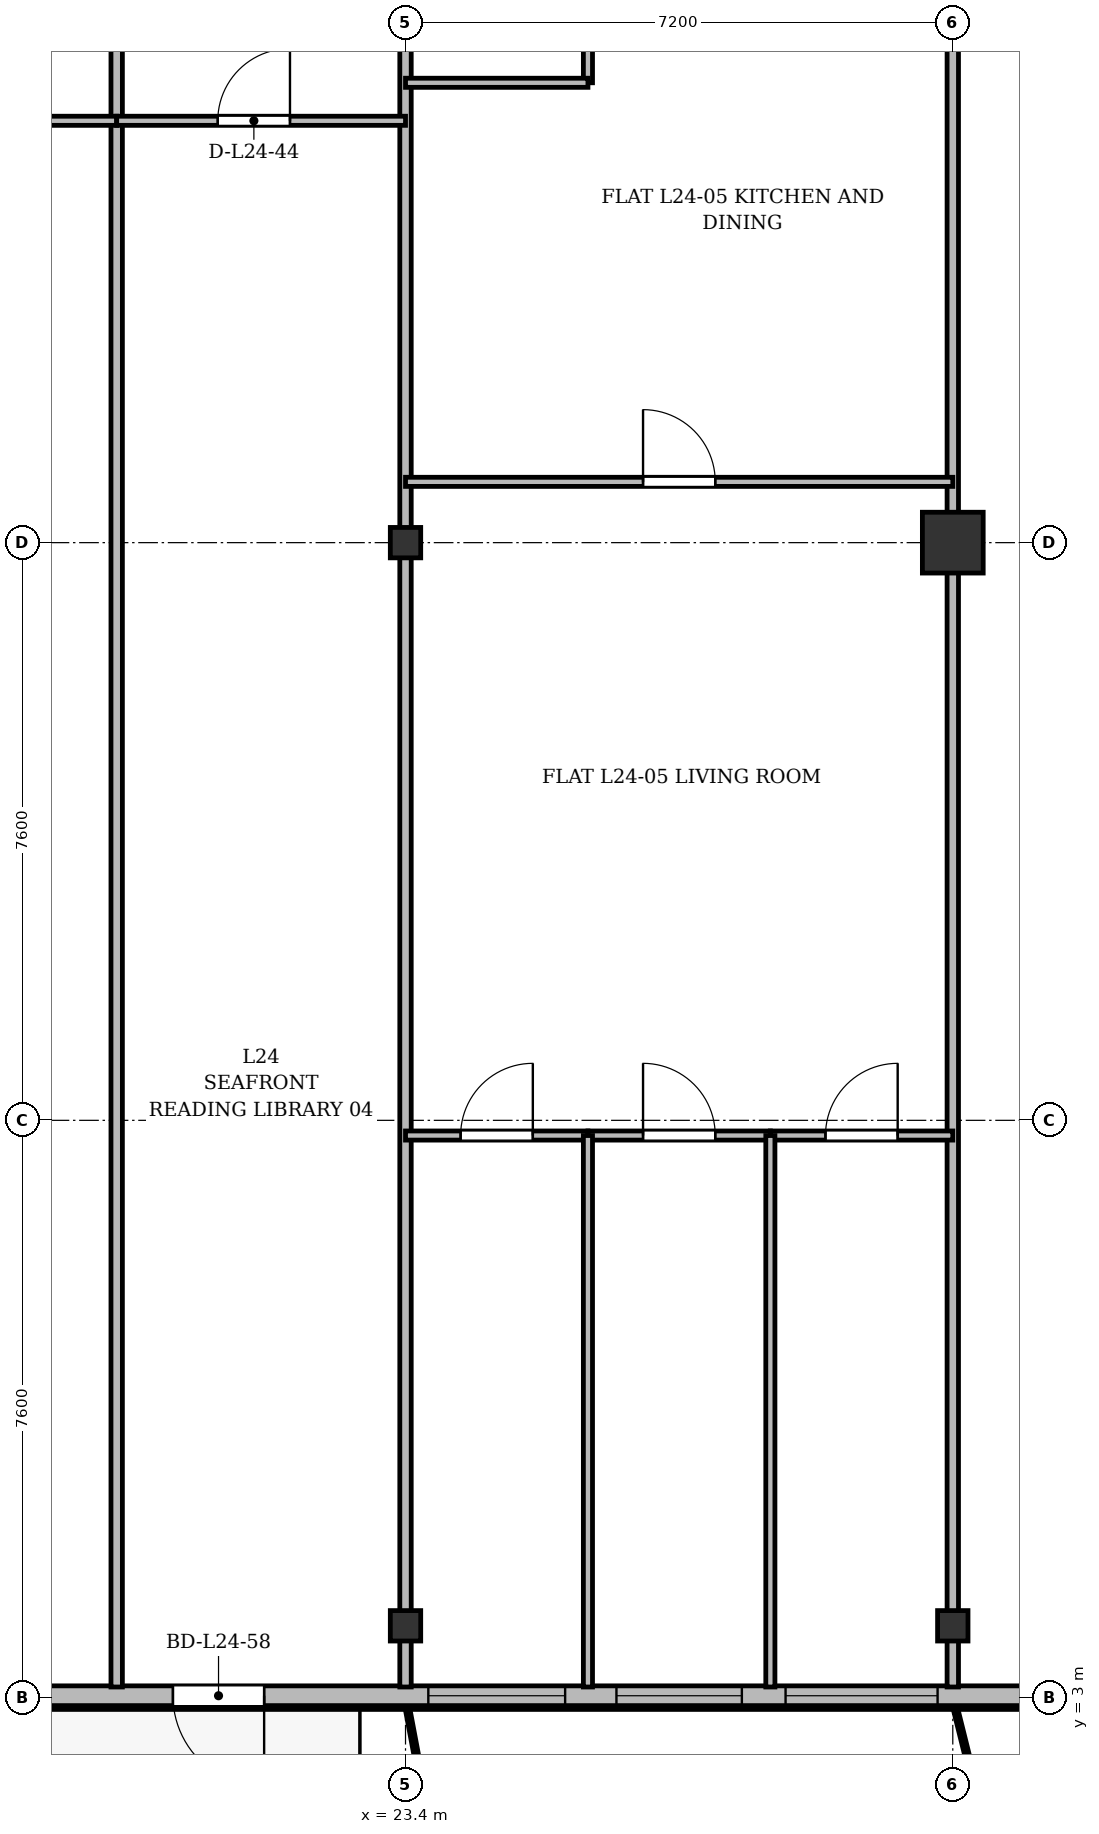
"""IFC4 building model, lengths in metres.
Left out: names, types, materials, properties, quantities, classifications, styles, units other than length and angle.
Written with IfcOpenShell. Run it as: python <this file> out.ifc"""

import sys

from ifc_helpers import new_model, si_unit, direction, frame, frame_2d, origin, origin_2d, place, context, subcontext, project, spatial, rectangle, i_section, extrude, source, transform, mapped, element, fill, save


model = new_model("IFC4")
c1 = context("Model", 3, precision=1e-05, world=origin(), true_north=direction((0.0, 1.0)))
c2 = subcontext(c1, "Body", "Model", "MODEL_VIEW")
j1 = project(units=[si_unit("LENGTHUNIT", "METRE"), si_unit("PLANEANGLEUNIT", "RADIAN")], contexts=[c1])
p1 = place(None, origin())
s1 = spatial("IfcSite", under=j1, at=p1, CompositionType="ELEMENT")
p2 = place(p1, origin())
s2 = spatial("IfcBuilding", under=s1, at=p2, CompositionType="ELEMENT")
p3 = place(p2, frame((0.0, 0.0, 96.1)))
s3 = spatial("IfcBuildingStorey", under=s2, at=p3, CompositionType="ELEMENT", Elevation=96.1)
m1 = source(origin(), c2, "Body", "SweptSolid", [
    extrude(i_section(OverallWidth=0.4, OverallDepth=0.4, WebThickness=0.022, FlangeThickness=0.035, at=origin_2d()), origin(), (0.0, 0.0, 1.0), 3.6),
])
for number, where, z_axis, x_axis in (
    (1, (23.4, 3.95, 0.0), (0.0, 0.0, 1.0), (1.0, 0.0, 0.0)),
    (2, (23.4, 18.2, 0.0), (0.0, 0.0, 1.0), (1.0, 0.0, 0.0)),
    (3, (30.6, 3.95, 0.0), (0.0, 0.0, 1.0), (1.0, 0.0, 0.0)),
):
    element("IfcColumn", number, at=place(p3, frame(where, z_axis=z_axis, x_axis=x_axis)), inside=s3, PredefinedType="COLUMN", context=c2, shape_type="MappedRepresentation", body=[
        mapped(m1, transform((0.0, 0.0, 0.0), x_axis=(1.0, 0.0, 0.0), y_axis=(0.0, 1.0, 0.0), z_axis=(0.0, 0.0, 1.0), scale=1.0)),
    ])
m2 = source(origin(), c2, "Body", "SweptSolid", [
    extrude(rectangle(XDim=0.8, YDim=0.8, at=origin_2d()), origin(), (0.0, 0.0, 1.0), 3.6),
])
p4 = place(p3, frame((30.6, 18.2, 0.0), z_axis=(0.0, 0.0, 1.0), x_axis=(1.0, 0.0, 0.0)))
e4 = element("IfcColumn", 4, at=p4, inside=s3, PredefinedType="COLUMN", context=c2, shape_type="MappedRepresentation", body=[
    mapped(m2, transform((0.0, 0.0, 0.0), x_axis=(1.0, 0.0, 0.0), y_axis=(0.0, 1.0, 0.0), z_axis=(0.0, 0.0, 1.0), scale=1.0)),
])
p5 = place(p3, frame((66.9, 3.03, 0.0), z_axis=(0.0, 0.0, 1.0), x_axis=(-1.0, 0.0, 0.0)))
e5 = element("IfcWall", 5, at=p5, inside=s3, PredefinedType="SOLIDWALL", context=c2, shape_type="SweptSolid", body=[
    extrude(rectangle(XDim=59.4, YDim=0.26, at=frame_2d((29.7, 0.0))), origin(), (0.0, 0.0, 1.0), 3.34),
])
p6 = place(p5, frame((2.1, 0.0, 0.9)))
e6 = element("IfcOpeningElement", 6, at=p6, cuts=e5, PredefinedType="OPENING", context=c2, shape_type="SweptSolid", body=[
    extrude(rectangle(XDim=1.8, YDim=1.8, at=frame_2d((0.9, 0.9))), frame((0.0, 0.14, 0.0), z_axis=(0.0, -1.0, 0.0), x_axis=(1.0, 0.0, 0.0)), (0.0, 0.0, 1.0), 0.28),
])
p7 = place(p5, frame((5.3, 0.0, 0.9)))
e7 = element("IfcOpeningElement", 7, at=p7, cuts=e5, PredefinedType="OPENING", context=c2, shape_type="SweptSolid", body=[
    extrude(rectangle(XDim=2.2, YDim=1.8, at=frame_2d((1.1, 0.9))), frame((0.0, 0.14, 0.0), z_axis=(0.0, -1.0, 0.0), x_axis=(1.0, 0.0, 0.0)), (0.0, 0.0, 1.0), 0.28),
])
p8 = place(p5, frame((8.65, 0.0, 0.9)))
e8 = element("IfcOpeningElement", 8, at=p8, cuts=e5, PredefinedType="OPENING", context=c2, shape_type="SweptSolid", body=[
    extrude(rectangle(XDim=1.5, YDim=1.75, at=frame_2d((0.75, 0.875))), frame((0.0, 0.14, 0.0), z_axis=(0.0, -1.0, 0.0), x_axis=(1.0, 0.0, 0.0)), (0.0, 0.0, 1.0), 0.28),
])
p9 = place(p5, frame((11.0, 0.0, 0.9)))
e9 = element("IfcOpeningElement", 9, at=p9, cuts=e5, PredefinedType="OPENING", context=c2, shape_type="SweptSolid", body=[
    extrude(rectangle(XDim=2.0, YDim=1.95, at=frame_2d((1.0, 0.975))), frame((0.0, 0.14, 0.0), z_axis=(0.0, -1.0, 0.0), x_axis=(1.0, 0.0, 0.0)), (0.0, 0.0, 1.0), 0.28),
])
p10 = place(p5, frame((13.775, 0.0, 0.9)))
e10 = element("IfcOpeningElement", 10, at=p10, cuts=e5, PredefinedType="OPENING", context=c2, shape_type="SweptSolid", body=[
    extrude(rectangle(XDim=1.65, YDim=1.85, at=frame_2d((0.825, 0.925))), frame((0.0, 0.14, 0.0), z_axis=(0.0, -1.0, 0.0), x_axis=(1.0, 0.0, 0.0)), (0.0, 0.0, 1.0), 0.28),
])
p11 = place(p5, frame((16.7, 0.0, 0.9)))
e11 = element("IfcOpeningElement", 11, at=p11, cuts=e5, PredefinedType="OPENING", context=c2, shape_type="SweptSolid", body=[
    extrude(rectangle(XDim=1.8, YDim=1.8, at=frame_2d((0.9, 0.9))), frame((0.0, 0.14, 0.0), z_axis=(0.0, -1.0, 0.0), x_axis=(1.0, 0.0, 0.0)), (0.0, 0.0, 1.0), 0.28),
])
p12 = place(p5, frame((20.227, 0.0, 0.0)))
e12 = element("IfcOpeningElement", 12, at=p12, cuts=e5, PredefinedType="OPENING", context=c2, shape_type="SweptSolid", body=[
    extrude(rectangle(XDim=1.2, YDim=2.2, at=frame_2d((0.6, 1.1))), frame((0.0, 0.14, 0.0), z_axis=(0.0, -1.0, 0.0), x_axis=(1.0, 0.0, 0.0)), (0.0, 0.0, 1.0), 0.28),
])
p13 = place(p5, frame((28.95, 0.0, 0.9)))
e13 = element("IfcOpeningElement", 13, at=p13, cuts=e5, PredefinedType="OPENING", context=c2, shape_type="SweptSolid", body=[
    extrude(rectangle(XDim=1.5, YDim=1.75, at=frame_2d((0.75, 0.875))), frame((0.0, 0.14, 0.0), z_axis=(0.0, -1.0, 0.0), x_axis=(1.0, 0.0, 0.0)), (0.0, 0.0, 1.0), 0.28),
])
p14 = place(p5, frame((36.5, 0.0, 0.9)))
e14 = element("IfcOpeningElement", 14, at=p14, cuts=e5, PredefinedType="OPENING", context=c2, shape_type="SweptSolid", body=[
    extrude(rectangle(XDim=2.0, YDim=1.95, at=frame_2d((1.0, 0.975))), frame((0.0, 0.14, 0.0), z_axis=(0.0, -1.0, 0.0), x_axis=(1.0, 0.0, 0.0)), (0.0, 0.0, 1.0), 0.28),
])
p15 = place(p5, frame((39.075, 0.0, 0.9)))
e15 = element("IfcOpeningElement", 15, at=p15, cuts=e5, PredefinedType="OPENING", context=c2, shape_type="SweptSolid", body=[
    extrude(rectangle(XDim=1.65, YDim=1.85, at=frame_2d((0.825, 0.925))), frame((0.0, 0.14, 0.0), z_axis=(0.0, -1.0, 0.0), x_axis=(1.0, 0.0, 0.0)), (0.0, 0.0, 1.0), 0.28),
])
p16 = place(p5, frame((41.4, 0.0, 0.9)))
e16 = element("IfcOpeningElement", 16, at=p16, cuts=e5, PredefinedType="OPENING", context=c2, shape_type="SweptSolid", body=[
    extrude(rectangle(XDim=1.8, YDim=1.8, at=frame_2d((0.9, 0.9))), frame((0.0, 0.14, 0.0), z_axis=(0.0, -1.0, 0.0), x_axis=(1.0, 0.0, 0.0)), (0.0, 0.0, 1.0), 0.28),
])
p17 = place(p5, frame((45.36, 0.0, 0.0)))
e17 = element("IfcOpeningElement", 17, at=p17, cuts=e5, PredefinedType="OPENING", context=c2, shape_type="SweptSolid", body=[
    extrude(rectangle(XDim=1.2, YDim=2.2, at=frame_2d((0.6, 1.1))), frame((0.0, 0.14, 0.0), z_axis=(0.0, -1.0, 0.0), x_axis=(1.0, 0.0, 0.0)), (0.0, 0.0, 1.0), 0.28),
])
p18 = place(p5, frame((48.55, 0.0, 0.9)))
e18 = element("IfcOpeningElement", 18, at=p18, cuts=e5, PredefinedType="OPENING", context=c2, shape_type="SweptSolid", body=[
    extrude(rectangle(XDim=1.5, YDim=1.75, at=frame_2d((0.75, 0.875))), frame((0.0, 0.14, 0.0), z_axis=(0.0, -1.0, 0.0), x_axis=(1.0, 0.0, 0.0)), (0.0, 0.0, 1.0), 0.28),
])
p19 = place(p5, frame((52.0, 0.0, 0.9)))
e19 = element("IfcOpeningElement", 19, at=p19, cuts=e5, PredefinedType="OPENING", context=c2, shape_type="SweptSolid", body=[
    extrude(rectangle(XDim=2.0, YDim=1.95, at=frame_2d((1.0, 0.975))), frame((0.0, 0.14, 0.0), z_axis=(0.0, -1.0, 0.0), x_axis=(1.0, 0.0, 0.0)), (0.0, 0.0, 1.0), 0.28),
])
p20 = place(p5, frame((55.575, 0.0, 0.9)))
e20 = element("IfcOpeningElement", 20, at=p20, cuts=e5, PredefinedType="OPENING", context=c2, shape_type="SweptSolid", body=[
    extrude(rectangle(XDim=1.65, YDim=1.85, at=frame_2d((0.825, 0.925))), frame((0.0, 0.14, 0.0), z_axis=(0.0, -1.0, 0.0), x_axis=(1.0, 0.0, 0.0)), (0.0, 0.0, 1.0), 0.28),
])
p21 = place(p3, frame((19.6, 3.145, 0.0), z_axis=(0.0, 0.0, 1.0), x_axis=(0.0, 1.0, 0.0)))
e21 = element("IfcWall", 21, at=p21, inside=s3, PredefinedType="PARTITIONING", context=c2, shape_type="SweptSolid", body=[
    extrude(rectangle(XDim=24.455, YDim=0.15, at=frame_2d((12.228, 0.0))), origin(), (0.0, 0.0, 1.0), 2.752),
])
for number, where, z_axis, x_axis in (
    (22, (23.4, 3.145, 0.0), (0.0, 0.0, 1.0), (0.0, 1.0, 0.0)),
    (23, (30.6, 3.145, 0.0), (0.0, 0.0, 1.0), (0.0, 1.0, 0.0)),
):
    element("IfcWall", number, at=place(p3, frame(where, z_axis=z_axis, x_axis=x_axis)), inside=s3, PredefinedType="PARTITIONING", context=c2, shape_type="SweptSolid", body=[
        extrude(rectangle(XDim=24.455, YDim=0.15, at=frame_2d((12.228, 0.0))), origin(), (0.0, 0.0, 1.0), 2.84),
    ])
p22 = place(p3, frame((15.6, 23.75, 0.0), z_axis=(0.0, 0.0, 1.0), x_axis=(1.0, 0.0, 0.0)))
e24 = element("IfcWall", 24, at=p22, inside=s3, PredefinedType="PARTITIONING", context=c2, shape_type="SweptSolid", body=[
    extrude(rectangle(XDim=4.0, YDim=0.12, at=frame_2d((2.0, 0.0))), origin(), (0.0, 0.0, 1.0), 2.84),
])
p23 = place(p22, frame((1.525, 0.0, 0.0)))
e25 = element("IfcOpeningElement", 25, at=p23, cuts=e24, PredefinedType="OPENING", context=c2, shape_type="SweptSolid", body=[
    extrude(rectangle(XDim=0.95, YDim=2.15, at=frame_2d((0.475, 1.075))), frame((0.0, 0.07, 0.0), z_axis=(0.0, -1.0, 0.0), x_axis=(1.0, 0.0, 0.0)), (0.0, 0.0, 1.0), 0.14),
])
p24 = place(p3, frame((19.6, 23.75, 0.0), z_axis=(0.0, 0.0, 1.0), x_axis=(1.0, 0.0, 0.0)))
e26 = element("IfcWall", 26, at=p24, inside=s3, PredefinedType="PARTITIONING", context=c2, shape_type="SweptSolid", body=[
    extrude(rectangle(XDim=3.8, YDim=0.12, at=frame_2d((1.9, 0.0))), origin(), (0.0, 0.0, 1.0), 2.84),
])
p25 = place(p24, frame((1.33, 0.0, 0.0)))
e27 = element("IfcOpeningElement", 27, at=p25, cuts=e26, PredefinedType="OPENING", context=c2, shape_type="SweptSolid", body=[
    extrude(rectangle(XDim=0.95, YDim=2.15, at=frame_2d((0.475, 1.075))), frame((0.0, 0.07, 0.0), z_axis=(0.0, -1.0, 0.0), x_axis=(1.0, 0.0, 0.0)), (0.0, 0.0, 1.0), 0.14),
])
p26 = place(p3, frame((23.4, 19.0, 0.0), z_axis=(0.0, 0.0, 1.0), x_axis=(1.0, 0.0, 0.0)))
e28 = element("IfcWall", 28, at=p26, inside=s3, PredefinedType="PARTITIONING", context=c2, shape_type="SweptSolid", body=[
    extrude(rectangle(XDim=7.2, YDim=0.12, at=frame_2d((3.6, 0.0))), origin(), (0.0, 0.0, 1.0), 2.84),
])
p27 = place(p26, frame((3.125, 0.0, 0.0)))
e29 = element("IfcOpeningElement", 29, at=p27, cuts=e28, PredefinedType="OPENING", context=c2, shape_type="SweptSolid", body=[
    extrude(rectangle(XDim=0.95, YDim=2.15, at=frame_2d((0.475, 1.075))), frame((0.0, 0.07, 0.0), z_axis=(0.0, -1.0, 0.0), x_axis=(1.0, 0.0, 0.0)), (0.0, 0.0, 1.0), 0.14),
])
p28 = place(p3, frame((25.8, 24.25, 0.0), z_axis=(0.0, 0.0, 1.0), x_axis=(0.0, 1.0, 0.0)))
e30 = element("IfcWall", 30, at=p28, inside=s3, PredefinedType="PARTITIONING", context=c2, shape_type="SweptSolid", body=[
    extrude(rectangle(XDim=3.35, YDim=0.12, at=frame_2d((1.675, 0.0))), origin(), (0.0, 0.0, 1.0), 2.99),
])
p29 = place(p28, frame((0.8, 0.0, 0.0)))
e31 = element("IfcOpeningElement", 31, at=p29, cuts=e30, PredefinedType="OPENING", context=c2, shape_type="SweptSolid", body=[
    extrude(rectangle(XDim=0.85, YDim=2.1, at=frame_2d((0.425, 1.05))), frame((0.0, 0.07, 0.0), z_axis=(0.0, -1.0, 0.0), x_axis=(1.0, 0.0, 0.0)), (0.0, 0.0, 1.0), 0.14),
])
p30 = place(p3, frame((23.4, 24.25, 0.0), z_axis=(0.0, 0.0, 1.0), x_axis=(1.0, 0.0, 0.0)))
e32 = element("IfcWall", 32, at=p30, inside=s3, PredefinedType="PARTITIONING", context=c2, shape_type="SweptSolid", body=[
    extrude(rectangle(XDim=2.4, YDim=0.12, at=frame_2d((1.2, 0.0))), origin(), (0.0, 0.0, 1.0), 2.84),
])
p31 = place(p3, frame((23.4, 10.4, 0.0), z_axis=(0.0, 0.0, 1.0), x_axis=(1.0, 0.0, 0.0)))
e33 = element("IfcWall", 33, at=p31, inside=s3, PredefinedType="PARTITIONING", context=c2, shape_type="SweptSolid", body=[
    extrude(rectangle(XDim=2.4, YDim=0.12, at=frame_2d((1.2, 0.0))), origin(), (0.0, 0.0, 1.0), 2.84),
])
p32 = place(p31, frame((0.725, 0.0, 0.0)))
e34 = element("IfcOpeningElement", 34, at=p32, cuts=e33, PredefinedType="OPENING", context=c2, shape_type="SweptSolid", body=[
    extrude(rectangle(XDim=0.95, YDim=2.15, at=frame_2d((0.475, 1.075))), frame((0.0, 0.07, 0.0), z_axis=(0.0, -1.0, 0.0), x_axis=(1.0, 0.0, 0.0)), (0.0, 0.0, 1.0), 0.14),
])
p33 = place(p3, frame((25.8, 10.4, 0.0), z_axis=(0.0, 0.0, 1.0), x_axis=(1.0, 0.0, 0.0)))
e35 = element("IfcWall", 35, at=p33, inside=s3, PredefinedType="PARTITIONING", context=c2, shape_type="SweptSolid", body=[
    extrude(rectangle(XDim=2.4, YDim=0.12, at=frame_2d((1.2, 0.0))), origin(), (0.0, 0.0, 1.0), 3.34),
])
p34 = place(p33, frame((0.725, 0.0, 0.0)))
e36 = element("IfcOpeningElement", 36, at=p34, cuts=e35, PredefinedType="OPENING", context=c2, shape_type="SweptSolid", body=[
    extrude(rectangle(XDim=0.95, YDim=2.15, at=frame_2d((0.475, 1.075))), frame((0.0, 0.07, 0.0), z_axis=(0.0, -1.0, 0.0), x_axis=(1.0, 0.0, 0.0)), (0.0, 0.0, 1.0), 0.14),
])
p35 = place(p3, frame((25.8, 3.145, 0.0), z_axis=(0.0, 0.0, 1.0), x_axis=(0.0, 1.0, 0.0)))
e37 = element("IfcWall", 37, at=p35, inside=s3, PredefinedType="PARTITIONING", context=c2, shape_type="SweptSolid", body=[
    extrude(rectangle(XDim=7.255, YDim=0.12, at=frame_2d((3.627, 0.0))), origin(), (0.0, 0.0, 1.0), 2.752),
])
p36 = place(p3, frame((28.2, 10.4, 0.0), z_axis=(0.0, 0.0, 1.0), x_axis=(1.0, 0.0, 0.0)))
e38 = element("IfcWall", 38, at=p36, inside=s3, PredefinedType="PARTITIONING", context=c2, shape_type="SweptSolid", body=[
    extrude(rectangle(XDim=2.4, YDim=0.12, at=frame_2d((1.2, 0.0))), origin(), (0.0, 0.0, 1.0), 2.84),
])
p37 = place(p36, frame((0.725, 0.0, 0.0)))
e39 = element("IfcOpeningElement", 39, at=p37, cuts=e38, PredefinedType="OPENING", context=c2, shape_type="SweptSolid", body=[
    extrude(rectangle(XDim=0.95, YDim=2.15, at=frame_2d((0.475, 1.075))), frame((0.0, 0.07, 0.0), z_axis=(0.0, -1.0, 0.0), x_axis=(1.0, 0.0, 0.0)), (0.0, 0.0, 1.0), 0.14),
])
p38 = place(p3, frame((28.2, 3.145, 0.0), z_axis=(0.0, 0.0, 1.0), x_axis=(0.0, 1.0, 0.0)))
e40 = element("IfcWall", 40, at=p38, inside=s3, PredefinedType="PARTITIONING", context=c2, shape_type="SweptSolid", body=[
    extrude(rectangle(XDim=7.255, YDim=0.12, at=frame_2d((3.627, 0.0))), origin(), (0.0, 0.0, 1.0), 2.752),
])
m3 = source(origin(), c2, "Body", "SweptSolid", [
    extrude(rectangle(XDim=2.0, YDim=1.95, at=frame_2d((1.0, 0.975))), frame((0.0, 0.03, 0.0), z_axis=(0.0, -1.0, 0.0), x_axis=(1.0, 0.0, 0.0)), (0.0, 0.0, 1.0), 0.06),
])
p39 = place(p14, origin())
e41 = element("IfcWindow", 41, at=p39, inside=s3, PartitioningType="SINGLE_PANEL", PredefinedType="WINDOW", context=c2, shape_type="MappedRepresentation", body=[
    mapped(m3, transform((0.0, 0.0, 0.0), x_axis=(1.0, 0.0, 0.0), y_axis=(0.0, 1.0, 0.0), z_axis=(0.0, 0.0, 1.0), scale=1.0)),
])
fill(e14, e41)
m4 = source(origin(), c2, "Body", "SweptSolid", [
    extrude(rectangle(XDim=1.65, YDim=1.85, at=frame_2d((0.825, 0.925))), frame((0.0, 0.03, 0.0), z_axis=(0.0, -1.0, 0.0), x_axis=(1.0, 0.0, 0.0)), (0.0, 0.0, 1.0), 0.06),
])
p40 = place(p15, origin())
e42 = element("IfcWindow", 42, at=p40, inside=s3, PartitioningType="SINGLE_PANEL", PredefinedType="WINDOW", context=c2, shape_type="MappedRepresentation", body=[
    mapped(m4, transform((0.0, 0.0, 0.0), x_axis=(1.0, 0.0, 0.0), y_axis=(0.0, 1.0, 0.0), z_axis=(0.0, 0.0, 1.0), scale=1.0)),
])
fill(e15, e42)
m5 = source(origin(), c2, "Body", "SweptSolid", [
    extrude(rectangle(XDim=1.8, YDim=1.8, at=frame_2d((0.9, 0.9))), frame((0.0, 0.03, 0.0), z_axis=(0.0, -1.0, 0.0), x_axis=(1.0, 0.0, 0.0)), (0.0, 0.0, 1.0), 0.06),
])
p41 = place(p16, origin())
e43 = element("IfcWindow", 43, at=p41, inside=s3, PartitioningType="SINGLE_PANEL", PredefinedType="WINDOW", context=c2, shape_type="MappedRepresentation", body=[
    mapped(m5, transform((0.0, 0.0, 0.0), x_axis=(1.0, 0.0, 0.0), y_axis=(0.0, 1.0, 0.0), z_axis=(0.0, 0.0, 1.0), scale=1.0)),
])
fill(e16, e43)
m6 = source(origin(), c2, "Body", "SweptSolid", [
    extrude(rectangle(XDim=1.2, YDim=2.2, at=frame_2d((0.6, 1.1))), frame((0.0, 0.025, 0.0), z_axis=(0.0, -1.0, 0.0), x_axis=(1.0, 0.0, 0.0)), (0.0, 0.0, 1.0), 0.05),
])
p42 = place(p17, origin())
e44 = element("IfcDoor", 44, at=p42, inside=s3, OperationType="SINGLE_SWING_LEFT", PredefinedType="DOOR", context=c2, shape_type="MappedRepresentation", body=[
    mapped(m6, transform((0.0, 0.0, 0.0), x_axis=(1.0, 0.0, 0.0), y_axis=(0.0, 1.0, 0.0), z_axis=(0.0, 0.0, 1.0), scale=1.0)),
])
fill(e17, e44)
m7 = source(origin(), c2, "Body", "SweptSolid", [
    extrude(rectangle(XDim=0.95, YDim=2.15, at=frame_2d((0.475, 1.075))), frame((0.0, 0.025, 0.0), z_axis=(0.0, -1.0, 0.0), x_axis=(1.0, 0.0, 0.0)), (0.0, 0.0, 1.0), 0.05),
])
p43 = place(p25, origin())
e45 = element("IfcDoor", 45, at=p43, inside=s3, OperationType="SINGLE_SWING_RIGHT", PredefinedType="DOOR", context=c2, shape_type="MappedRepresentation", body=[
    mapped(m7, transform((0.0, 0.0, 0.0), x_axis=(1.0, 0.0, 0.0), y_axis=(0.0, 1.0, 0.0), z_axis=(0.0, 0.0, 1.0), scale=1.0)),
])
fill(e27, e45)
p44 = place(p27, origin())
e46 = element("IfcDoor", 46, at=p44, inside=s3, OperationType="SINGLE_SWING_LEFT", PredefinedType="DOOR", context=c2, shape_type="MappedRepresentation", body=[
    mapped(m7, transform((0.0, 0.0, 0.0), x_axis=(1.0, 0.0, 0.0), y_axis=(0.0, 1.0, 0.0), z_axis=(0.0, 0.0, 1.0), scale=1.0)),
])
fill(e29, e46)
p45 = place(p32, origin())
e47 = element("IfcDoor", 47, at=p45, inside=s3, OperationType="SINGLE_SWING_RIGHT", PredefinedType="DOOR", context=c2, shape_type="MappedRepresentation", body=[
    mapped(m7, transform((0.0, 0.0, 0.0), x_axis=(1.0, 0.0, 0.0), y_axis=(0.0, 1.0, 0.0), z_axis=(0.0, 0.0, 1.0), scale=1.0)),
])
fill(e34, e47)
p46 = place(p34, origin())
e48 = element("IfcDoor", 48, at=p46, inside=s3, OperationType="SINGLE_SWING_LEFT", PredefinedType="DOOR", context=c2, shape_type="MappedRepresentation", body=[
    mapped(m7, transform((0.0, 0.0, 0.0), x_axis=(1.0, 0.0, 0.0), y_axis=(0.0, 1.0, 0.0), z_axis=(0.0, 0.0, 1.0), scale=1.0)),
])
fill(e36, e48)
p47 = place(p37, origin())
e49 = element("IfcDoor", 49, at=p47, inside=s3, OperationType="SINGLE_SWING_RIGHT", PredefinedType="DOOR", context=c2, shape_type="MappedRepresentation", body=[
    mapped(m7, transform((0.0, 0.0, 0.0), x_axis=(1.0, 0.0, 0.0), y_axis=(0.0, 1.0, 0.0), z_axis=(0.0, 0.0, 1.0), scale=1.0)),
])
fill(e39, e49)
save(model, sys.argv[1])
